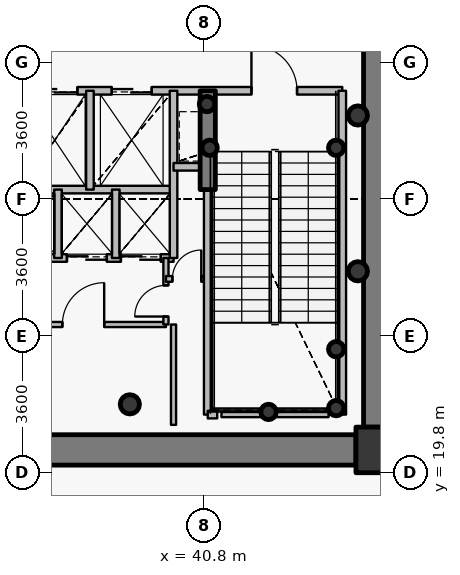
"""IFC4 building model, lengths in metres.
Left out: names, types, materials, properties, quantities, classifications, styles, units other than length and angle.
Written with IfcOpenShell. Run it as: python <this file> out.ifc"""

import sys

from ifc_helpers import new_model, si_unit, direction, frame, frame_2d, origin, origin_2d, place, context, subcontext, project, spatial, rectangle, hollow_circle, extrude, source, transform, mapped, element, fill, save


model = new_model("IFC4")
c1 = context("Model", 3, precision=1e-05, world=origin(), true_north=direction((0.0, 1.0)))
c2 = subcontext(c1, "Body", "Model", "MODEL_VIEW")
j1 = project(units=[si_unit("LENGTHUNIT", "METRE"), si_unit("PLANEANGLEUNIT", "RADIAN")], contexts=[c1])
p1 = place(None, origin())
s1 = spatial("IfcSite", under=j1, at=p1, CompositionType="ELEMENT")
p2 = place(p1, origin())
s2 = spatial("IfcBuilding", under=s1, at=p2, CompositionType="ELEMENT")
p3 = place(p2, frame((0.0, 0.0, 151.35)))
s3 = spatial("IfcBuildingStorey", under=s2, at=p3, CompositionType="ELEMENT", Elevation=151.35)
p4 = place(p3, frame((45.4, 20.4, 0.0), z_axis=(0.0, 0.0, 1.0), x_axis=(1.0, 0.0, 0.0)))
e1 = element("IfcColumn", 1, at=p4, inside=s3, PredefinedType="COLUMN", context=c2, shape_type="SweptSolid", body=[
    extrude(rectangle(XDim=1.2, YDim=1.2, at=origin_2d()), origin(), (0.0, 0.0, 1.0), 4.8),
])
p5 = place(p3, frame((38.85, 21.6, 0.0), z_axis=(0.0, 0.0, 1.0), x_axis=(1.0, 0.0, 0.0)))
e2 = element("IfcColumn", 2, at=p5, inside=s3, PredefinedType="COLUMN", context=c2, shape_type="SweptSolid", body=[
    extrude(hollow_circle(Radius=0.254, WallThickness=0.02, at=origin_2d()), origin(), (0.0, 0.0, 1.0), 4.8),
])
for number, where, z_axis, x_axis in (
    (3, (44.28, 21.5, 0.0), (0.0, 0.0, 1.0), (1.0, 0.0, 0.0)),
    (4, (44.28, 23.05, 0.0), (0.0, 0.0, 1.0), (1.0, 0.0, 0.0)),
    (5, (42.5, 21.4, 0.0), (0.0, 0.0, 1.0), (1.0, 0.0, 0.0)),
    (6, (40.95, 28.35, 0.0), (0.0, 0.0, 1.0), (1.0, 0.0, 0.0)),
    (7, (44.28, 28.35, 0.0), (0.0, 0.0, 1.0), (1.0, 0.0, 0.0)),
    (8, (40.88, 29.5, 0.0), (0.0, 0.0, 1.0), (1.0, 0.0, 0.0)),
):
    element("IfcColumn", number, at=place(p3, frame(where, z_axis=z_axis, x_axis=x_axis)), inside=s3, PredefinedType="COLUMN", context=c2, shape_type="SweptSolid", body=[
        extrude(hollow_circle(Radius=0.203, WallThickness=0.016, at=origin_2d()), origin(), (0.0, 0.0, 1.0), 4.8),
    ])
p6 = place(p3, frame((45.4, 33.0, 0.0), z_axis=(0.0, 0.0, 1.0), x_axis=(0.0, -1.0, 0.0)))
e9 = element("IfcWall", 9, at=p6, inside=s3, PredefinedType="SHEAR", context=c2, shape_type="SweptSolid", body=[
    extrude(rectangle(XDim=12.0, YDim=0.8, at=frame_2d((6.0, 0.0))), origin(), (0.0, 0.0, 1.0), 4.0),
])
p7 = place(p3, frame((44.8, 20.4, 0.0), z_axis=(0.0, 0.0, 1.0), x_axis=(-1.0, 0.0, 0.0)))
e10 = element("IfcWall", 10, at=p7, inside=s3, PredefinedType="SHEAR", context=c2, shape_type="SweptSolid", body=[
    extrude(rectangle(XDim=17.6, YDim=0.8, at=frame_2d((8.8, 0.0))), origin(), (0.0, 0.0, 1.0), 4.0),
])
p8 = place(p7, frame((9.55, 0.0, 0.0)))
e11 = element("IfcOpeningElement", 11, at=p8, cuts=e10, PredefinedType="OPENING", context=c2, shape_type="SweptSolid", body=[
    extrude(rectangle(XDim=1.15, YDim=2.15, at=origin_2d()), frame((0.575, 0.41, 1.075), z_axis=(0.0, -1.0, 0.0), x_axis=(1.0, 0.0, 0.0)), (0.0, 0.0, 1.0), 0.82),
])
p9 = place(p3, frame((40.9, 27.25, 0.0), z_axis=(0.0, 0.0, 1.0), x_axis=(0.0, 1.0, 0.0)))
e12 = element("IfcWall", 12, at=p9, inside=s3, PredefinedType="SHEAR", context=c2, shape_type="SweptSolid", body=[
    extrude(rectangle(XDim=2.6, YDim=0.4, at=frame_2d((1.3, 0.0))), origin(), (0.0, 0.0, 1.0), 4.15),
])
for number, where, z_axis, x_axis in (
    (13, (44.85, 25.1, 0.0), (0.0, 0.0, 1.0), (1.0, 0.0, 0.0)),
    (14, (44.85, 29.2, 0.0), (0.0, 0.0, 1.0), (1.0, 0.0, 0.0)),
):
    element("IfcColumn", number, at=place(p3, frame(where, z_axis=z_axis, x_axis=x_axis)), inside=s3, PredefinedType="COLUMN", context=c2, shape_type="SweptSolid", body=[
        extrude(hollow_circle(Radius=0.254, WallThickness=0.02, at=origin_2d()), origin(), (0.0, 0.0, 1.0), 4.8),
    ])
p10 = place(p3, frame((35.05, 27.25, 0.0), z_axis=(0.0, 0.0, 1.0), x_axis=(1.0, 0.0, 0.0)))
e15 = element("IfcWall", 15, at=p10, inside=s3, PredefinedType="PARTITIONING", context=c2, shape_type="SweptSolid", body=[
    extrude(rectangle(XDim=4.95, YDim=0.2, at=frame_2d((2.475, 0.0))), origin(), (0.0, 0.0, 1.0), 4.135),
])
p11 = place(p3, frame((35.45, 23.7, 0.0), z_axis=(0.0, 0.0, 1.0), x_axis=(1.0, 0.0, 0.0)))
e16 = element("IfcWall", 16, at=p11, inside=s3, PredefinedType="PARTITIONING", context=c2, shape_type="SweptSolid", body=[
    extrude(rectangle(XDim=4.35, YDim=0.135, at=frame_2d((2.175, 0.0))), origin(), (0.0, 0.0, 1.0), 4.135),
])
p12 = place(p11, frame((1.625, 0.0, 0.0)))
e17 = element("IfcOpeningElement", 17, at=p12, cuts=e16, PredefinedType="OPENING", context=c2, shape_type="SweptSolid", body=[
    extrude(rectangle(XDim=1.1, YDim=2.15, at=origin_2d()), frame((0.55, 0.078, 1.075), z_axis=(0.0, -1.0, 0.0), x_axis=(1.0, 0.0, 0.0)), (0.0, 0.0, 1.0), 0.155),
])
p13 = place(p3, frame((35.45, 25.45, 0.0), z_axis=(0.0, 0.0, 1.0), x_axis=(1.0, 0.0, 0.0)))
e18 = element("IfcWall", 18, at=p13, inside=s3, PredefinedType="PARTITIONING", context=c2, shape_type="SweptSolid", body=[
    extrude(rectangle(XDim=4.55, YDim=0.2, at=frame_2d((2.275, 0.0))), origin(), (0.0, 0.0, 1.0), 4.135),
])
p14 = place(p13, frame((0.25, 0.0, 0.0)))
e19 = element("IfcOpeningElement", 19, at=p14, cuts=e18, PredefinedType="OPENING", context=c2, shape_type="SweptSolid", body=[
    extrude(rectangle(XDim=1.05, YDim=2.15, at=origin_2d()), frame((0.525, 0.11, 1.075), z_axis=(0.0, -1.0, 0.0), x_axis=(1.0, 0.0, 0.0)), (0.0, 0.0, 1.0), 0.22),
])
p15 = place(p13, frame((1.745, 0.0, 0.0)))
e20 = element("IfcOpeningElement", 20, at=p15, cuts=e18, PredefinedType="OPENING", context=c2, shape_type="SweptSolid", body=[
    extrude(rectangle(XDim=1.05, YDim=2.15, at=origin_2d()), frame((0.525, 0.11, 1.075), z_axis=(0.0, -1.0, 0.0), x_axis=(1.0, 0.0, 0.0)), (0.0, 0.0, 1.0), 0.22),
])
p16 = place(p13, frame((3.165, 0.0, 0.0)))
e21 = element("IfcOpeningElement", 21, at=p16, cuts=e18, PredefinedType="OPENING", context=c2, shape_type="SweptSolid", body=[
    extrude(rectangle(XDim=1.05, YDim=2.15, at=origin_2d()), frame((0.525, 0.11, 1.075), z_axis=(0.0, -1.0, 0.0), x_axis=(1.0, 0.0, 0.0)), (0.0, 0.0, 1.0), 0.22),
])
p17 = place(p3, frame((35.95, 29.85, 0.0), z_axis=(0.0, 0.0, 1.0), x_axis=(1.0, 0.0, 0.0)))
e22 = element("IfcWall", 22, at=p17, inside=s3, PredefinedType="PARTITIONING", context=c2, shape_type="SweptSolid", body=[
    extrude(rectangle(XDim=8.49, YDim=0.2, at=frame_2d((4.245, 0.0))), origin(), (0.0, 0.0, 1.0), 4.135),
])
p18 = place(p17, frame((6.1, 0.0, 0.0)))
e23 = element("IfcOpeningElement", 23, at=p18, cuts=e22, PredefinedType="OPENING", context=c2, shape_type="SweptSolid", body=[
    extrude(rectangle(XDim=1.2, YDim=2.15, at=origin_2d()), frame((0.6, 0.11, 1.075), z_axis=(0.0, -1.0, 0.0), x_axis=(1.0, 0.0, 0.0)), (0.0, 0.0, 1.0), 0.22),
])
p19 = place(p17, frame((0.37, 0.0, 0.0)))
e24 = element("IfcOpeningElement", 24, at=p19, cuts=e22, PredefinedType="OPENING", context=c2, shape_type="SweptSolid", body=[
    extrude(rectangle(XDim=1.15, YDim=2.15, at=origin_2d()), frame((0.575, 0.11, 1.075), z_axis=(0.0, -1.0, 0.0), x_axis=(1.0, 0.0, 0.0)), (0.0, 0.0, 1.0), 0.22),
])
p20 = place(p17, frame((2.425, 0.0, 0.0)))
e25 = element("IfcOpeningElement", 25, at=p20, cuts=e22, PredefinedType="OPENING", context=c2, shape_type="SweptSolid", body=[
    extrude(rectangle(XDim=1.05, YDim=2.15, at=origin_2d()), frame((0.525, 0.11, 1.075), z_axis=(0.0, -1.0, 0.0), x_axis=(1.0, 0.0, 0.0)), (0.0, 0.0, 1.0), 0.22),
])
p21 = place(p3, frame((36.96, 25.45, 0.0), z_axis=(0.0, 0.0, 1.0), x_axis=(0.0, 1.0, 0.0)))
e26 = element("IfcWall", 26, at=p21, inside=s3, PredefinedType="PARTITIONING", context=c2, shape_type="SweptSolid", body=[
    extrude(rectangle(XDim=1.8, YDim=0.2, at=frame_2d((0.9, 0.0))), origin(), (0.0, 0.0, 1.0), 4.55),
])
p22 = place(p3, frame((37.8, 27.25, 0.0), z_axis=(0.0, 0.0, 1.0), x_axis=(0.0, 1.0, 0.0)))
e27 = element("IfcWall", 27, at=p22, inside=s3, PredefinedType="PARTITIONING", context=c2, shape_type="SweptSolid", body=[
    extrude(rectangle(XDim=2.6, YDim=0.2, at=frame_2d((1.3, 0.0))), origin(), (0.0, 0.0, 1.0), 4.55),
])
p23 = place(p3, frame((38.48, 25.45, 0.0), z_axis=(0.0, 0.0, 1.0), x_axis=(0.0, 1.0, 0.0)))
e28 = element("IfcWall", 28, at=p23, inside=s3, PredefinedType="PARTITIONING", context=c2, shape_type="SweptSolid", body=[
    extrude(rectangle(XDim=1.8, YDim=0.2, at=frame_2d((0.9, 0.0))), origin(), (0.0, 0.0, 1.0), 4.55),
])
p24 = place(p3, frame((39.8, 23.7, 0.0), z_axis=(0.0, 0.0, 1.0), x_axis=(0.0, 1.0, 0.0)))
e29 = element("IfcWall", 29, at=p24, inside=s3, PredefinedType="PARTITIONING", context=c2, shape_type="SweptSolid", body=[
    extrude(rectangle(XDim=1.75, YDim=0.135, at=frame_2d((0.875, 0.0))), origin(), (0.0, 0.0, 1.0), 4.55),
])
p25 = place(p24, frame((0.21, 0.0, 0.0)))
e30 = element("IfcOpeningElement", 30, at=p25, cuts=e29, PredefinedType="OPENING", context=c2, shape_type="SweptSolid", body=[
    extrude(rectangle(XDim=0.82, YDim=2.1, at=origin_2d()), frame((0.41, 0.078, 1.05), z_axis=(0.0, -1.0, 0.0), x_axis=(1.0, 0.0, 0.0)), (0.0, 0.0, 1.0), 0.155),
])
p26 = place(p3, frame((39.8, 24.9, 0.0), z_axis=(0.0, 0.0, 1.0), x_axis=(1.0, 0.0, 0.0)))
e31 = element("IfcWall", 31, at=p26, inside=s3, PredefinedType="PARTITIONING", context=c2, shape_type="SweptSolid", body=[
    extrude(rectangle(XDim=1.1, YDim=0.15, at=frame_2d((0.55, 0.0))), origin(), (0.0, 0.0, 1.0), 4.55),
])
p27 = place(p26, frame((0.17, 0.0, 0.0)))
e32 = element("IfcOpeningElement", 32, at=p27, cuts=e31, PredefinedType="OPENING", context=c2, shape_type="SweptSolid", body=[
    extrude(rectangle(XDim=0.76, YDim=2.1, at=origin_2d()), frame((0.38, 0.085, 1.05), z_axis=(0.0, -1.0, 0.0), x_axis=(1.0, 0.0, 0.0)), (0.0, 0.0, 1.0), 0.17),
])
p28 = place(p3, frame((40.0, 25.45, 0.0), z_axis=(0.0, 0.0, 1.0), x_axis=(0.0, 1.0, 0.0)))
e33 = element("IfcWall", 33, at=p28, inside=s3, PredefinedType="PARTITIONING", context=c2, shape_type="SweptSolid", body=[
    extrude(rectangle(XDim=4.4, YDim=0.2, at=frame_2d((2.2, 0.0))), origin(), (0.0, 0.0, 1.0), 4.55),
])
p29 = place(p3, frame((40.0, 27.85, 0.0), z_axis=(0.0, 0.0, 1.0), x_axis=(1.0, 0.0, 0.0)))
e34 = element("IfcWall", 34, at=p29, inside=s3, PredefinedType="PARTITIONING", context=c2, shape_type="SweptSolid", body=[
    extrude(rectangle(XDim=0.9, YDim=0.2, at=frame_2d((0.45, 0.0))), origin(), (0.0, 0.0, 1.0), 4.55),
])
p30 = place(p3, frame((40.9, 21.33, 0.0), z_axis=(0.0, 0.0, 1.0), x_axis=(0.0, 1.0, 0.0)))
e35 = element("IfcWall", 35, at=p30, inside=s3, PredefinedType="PARTITIONING", context=c2, shape_type="SweptSolid", body=[
    extrude(rectangle(XDim=5.91, YDim=0.2, at=frame_2d((2.955, 0.0))), origin(), (0.0, 0.0, 1.0), 4.085),
])
p31 = place(p3, frame((40.9, 21.33, 0.0), z_axis=(0.0, 0.0, 1.0), x_axis=(1.0, 0.0, 0.0)))
e36 = element("IfcWall", 36, at=p31, inside=s3, PredefinedType="PARTITIONING", context=c2, shape_type="SweptSolid", body=[
    extrude(rectangle(XDim=0.25, YDim=0.2, at=frame_2d((0.125, 0.0))), origin(), (0.0, 0.0, 1.0), 4.085),
])
p32 = place(p3, frame((44.44, 21.33, 0.0), z_axis=(0.0, 0.0, 1.0), x_axis=(0.0, 1.0, 0.0)))
e37 = element("IfcWall", 37, at=p32, inside=s3, PredefinedType="PARTITIONING", context=c2, shape_type="SweptSolid", body=[
    extrude(rectangle(XDim=8.52, YDim=0.2, at=frame_2d((4.26, 0.0))), origin(), (0.0, 0.0, 1.0), 4.55),
])
p33 = place(p3, frame((44.08, 21.33, 0.0), z_axis=(0.0, 0.0, 1.0), x_axis=(-1.0, 0.0, 0.0)))
e38 = element("IfcWall", 38, at=p33, inside=s3, PredefinedType="PARTITIONING", context=c2, shape_type="SweptSolid", body=[
    extrude(rectangle(XDim=2.82, YDim=0.135, at=frame_2d((1.41, 0.0))), origin(), (0.0, 0.0, 1.0), 4.085),
])
p34 = place(p3, frame((40.0, 23.7, 0.0), z_axis=(0.0, 0.0, 1.0), x_axis=(0.0, -1.0, 0.0)))
e39 = element("IfcWall", 39, at=p34, inside=s3, PredefinedType="PARTITIONING", context=c2, shape_type="SweptSolid", body=[
    extrude(rectangle(XDim=2.64, YDim=0.135, at=frame_2d((1.32, 0.0))), origin(), (0.0, 0.0, 1.0), 4.085),
])
p35 = place(p3, frame((44.81, 20.0, 0.0), z_axis=(0.0, 0.0, 1.0), x_axis=(1.0, 0.0, 0.0)))
e40 = element("IfcWall", 40, at=p35, inside=s3, PredefinedType="PARTITIONING", context=c2, shape_type="SweptSolid", body=[
    extrude(rectangle(XDim=0.99, YDim=0.135, at=frame_2d((0.495, 0.0))), origin(), (0.0, 0.0, 1.0), 3.985),
])
m1 = source(origin(), c2, "Body", "SweptSolid", [
    extrude(rectangle(XDim=1.2, YDim=2.15, at=origin_2d()), frame((0.6, 0.025, 1.075), z_axis=(0.0, -1.0, 0.0), x_axis=(1.0, 0.0, 0.0)), (0.0, 0.0, 1.0), 0.05),
])
p36 = place(p18, origin())
e41 = element("IfcDoor", 41, at=p36, inside=s3, OperationType="SINGLE_SWING_LEFT", PredefinedType="DOOR", context=c2, shape_type="MappedRepresentation", body=[
    mapped(m1, transform((0.0, 0.0, 0.0), x_axis=(1.0, 0.0, 0.0), y_axis=(0.0, 1.0, 0.0), z_axis=(0.0, 0.0, 1.0), scale=1.0)),
])
fill(e23, e41)
m2 = source(origin(), c2, "Body", "SweptSolid", [
    extrude(rectangle(XDim=1.15, YDim=2.15, at=origin_2d()), frame((0.575, 0.025, 1.075), z_axis=(0.0, -1.0, 0.0), x_axis=(1.0, 0.0, 0.0)), (0.0, 0.0, 1.0), 0.05),
])
p37 = place(p19, origin())
e42 = element("IfcDoor", 42, at=p37, inside=s3, OperationType="DOUBLE_DOOR_SLIDING", PredefinedType="USERDEFINED", context=c2, shape_type="MappedRepresentation", body=[
    mapped(m2, transform((0.0, 0.0, 0.0), x_axis=(1.0, 0.0, 0.0), y_axis=(0.0, 1.0, 0.0), z_axis=(0.0, 0.0, 1.0), scale=1.0)),
])
fill(e24, e42)
m3 = source(origin(), c2, "Body", "SweptSolid", [
    extrude(rectangle(XDim=1.05, YDim=2.15, at=origin_2d()), frame((0.525, 0.025, 1.075), z_axis=(0.0, -1.0, 0.0), x_axis=(1.0, 0.0, 0.0)), (0.0, 0.0, 1.0), 0.05),
])
p38 = place(p20, origin())
e43 = element("IfcDoor", 43, at=p38, inside=s3, OperationType="DOUBLE_DOOR_SLIDING", PredefinedType="USERDEFINED", context=c2, shape_type="MappedRepresentation", body=[
    mapped(m3, transform((0.0, 0.0, 0.0), x_axis=(1.0, 0.0, 0.0), y_axis=(0.0, 1.0, 0.0), z_axis=(0.0, 0.0, 1.0), scale=1.0)),
])
fill(e25, e43)
p39 = place(p15, origin())
e44 = element("IfcDoor", 44, at=p39, inside=s3, OperationType="DOUBLE_DOOR_SLIDING", PredefinedType="USERDEFINED", context=c2, shape_type="MappedRepresentation", body=[
    mapped(m3, transform((0.0, 0.0, 0.0), x_axis=(1.0, 0.0, 0.0), y_axis=(0.0, 1.0, 0.0), z_axis=(0.0, 0.0, 1.0), scale=1.0)),
])
fill(e20, e44)
p40 = place(p16, origin())
e45 = element("IfcDoor", 45, at=p40, inside=s3, OperationType="DOUBLE_DOOR_SLIDING", PredefinedType="USERDEFINED", context=c2, shape_type="MappedRepresentation", body=[
    mapped(m3, transform((0.0, 0.0, 0.0), x_axis=(1.0, 0.0, 0.0), y_axis=(0.0, 1.0, 0.0), z_axis=(0.0, 0.0, 1.0), scale=1.0)),
])
fill(e21, e45)
m4 = source(origin(), c2, "Body", "SweptSolid", [
    extrude(rectangle(XDim=1.1, YDim=2.15, at=origin_2d()), frame((0.55, 0.025, 1.075), z_axis=(0.0, -1.0, 0.0), x_axis=(1.0, 0.0, 0.0)), (0.0, 0.0, 1.0), 0.05),
])
p41 = place(p12, origin())
e46 = element("IfcDoor", 46, at=p41, inside=s3, OperationType="SINGLE_SWING_RIGHT", PredefinedType="DOOR", context=c2, shape_type="MappedRepresentation", body=[
    mapped(m4, transform((0.0, 0.0, 0.0), x_axis=(1.0, 0.0, 0.0), y_axis=(0.0, 1.0, 0.0), z_axis=(0.0, 0.0, 1.0), scale=1.0)),
])
fill(e17, e46)
m5 = source(origin(), c2, "Body", "SweptSolid", [
    extrude(rectangle(XDim=0.82, YDim=2.1, at=origin_2d()), frame((0.41, 0.025, 1.05), z_axis=(0.0, -1.0, 0.0), x_axis=(1.0, 0.0, 0.0)), (0.0, 0.0, 1.0), 0.05),
])
p42 = place(p25, origin())
e47 = element("IfcDoor", 47, at=p42, inside=s3, OperationType="SINGLE_SWING_LEFT", PredefinedType="DOOR", context=c2, shape_type="MappedRepresentation", body=[
    mapped(m5, transform((0.0, 0.0, 0.0), x_axis=(1.0, 0.0, 0.0), y_axis=(0.0, 1.0, 0.0), z_axis=(0.0, 0.0, 1.0), scale=1.0)),
])
fill(e30, e47)
m6 = source(origin(), c2, "Body", "SweptSolid", [
    extrude(rectangle(XDim=0.76, YDim=2.1, at=origin_2d()), frame((0.38, 0.025, 1.05), z_axis=(0.0, -1.0, 0.0), x_axis=(1.0, 0.0, 0.0)), (0.0, 0.0, 1.0), 0.05),
])
p43 = place(p27, origin())
e48 = element("IfcDoor", 48, at=p43, inside=s3, OperationType="SINGLE_SWING_RIGHT", PredefinedType="DOOR", context=c2, shape_type="MappedRepresentation", body=[
    mapped(m6, transform((0.0, 0.0, 0.0), x_axis=(1.0, 0.0, 0.0), y_axis=(0.0, 1.0, 0.0), z_axis=(0.0, 0.0, 1.0), scale=1.0)),
])
fill(e32, e48)
save(model, sys.argv[1])
